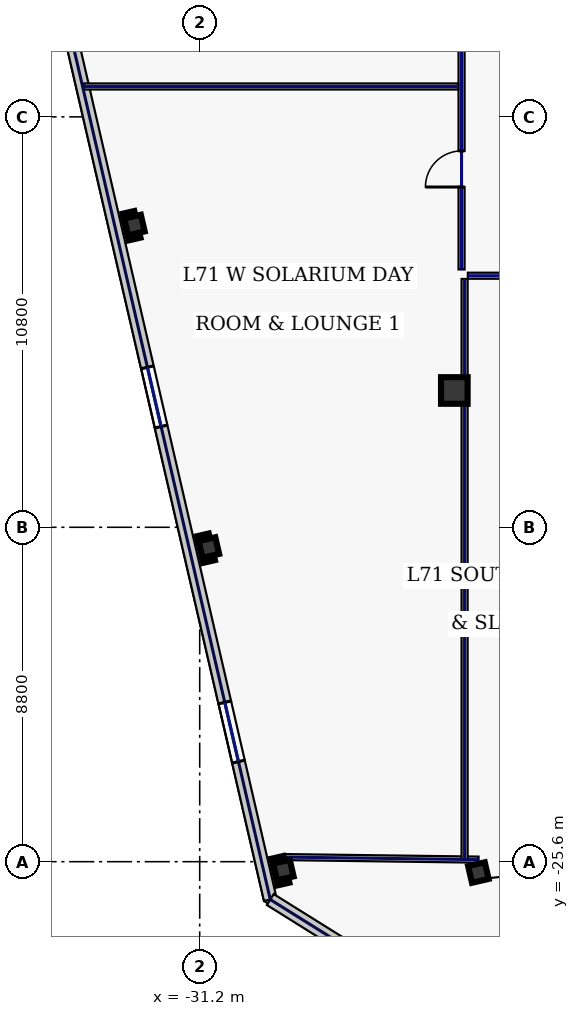
"""IFC4 building model, lengths in metres.
Left out: names, types, materials, properties, quantities, classifications, styles, units other than length and angle.
Written with IfcOpenShell. Run it as: python <this file> out.ifc"""

import sys

from ifc_helpers import new_model, si_unit, direction, frame, frame_2d, origin, origin_2d, place, context, subcontext, project, spatial, rectangle, hollow_rectangle, extrude, element, fill, save


model = new_model("IFC4")
c1 = context("Model", 3, precision=1e-05, world=origin(), true_north=direction((0.0, 1.0)))
c2 = subcontext(c1, "Body", "Model", "MODEL_VIEW")
j1 = project(units=[si_unit("LENGTHUNIT", "METRE"), si_unit("PLANEANGLEUNIT", "RADIAN")], contexts=[c1])
p1 = place(None, origin())
s1 = spatial("IfcSite", under=j1, at=p1, CompositionType="ELEMENT")
p2 = place(p1, origin())
s2 = spatial("IfcBuilding", under=s1, at=p2, CompositionType="ELEMENT")
p3 = place(p2, frame((0.0, 0.0, 305.0)))
s3 = spatial("IfcBuildingStorey", under=s2, at=p3, CompositionType="ELEMENT", Elevation=305.0)
p4 = place(p3, frame((-24.5, -13.2, 0.0), z_axis=(0.0, 0.0, 1.0), x_axis=(1.0, 0.0, 0.0)))
e1 = element("IfcColumn", 1, at=p4, inside=s3, PredefinedType="COLUMN", context=c2, shape_type="SweptSolid", body=[
    extrude(hollow_rectangle(XDim=0.7, YDim=0.7, WallThickness=0.032, at=origin_2d()), origin(), (0.0, 0.0, 1.0), 3.74),
])
for number, where, z_axis, x_axis in (
    (2, (-23.867, -25.886, 0.0), (0.0, 0.0, 1.0), (0.974, 0.225, 0.0)),
    (3, (-32.917, -8.845, 0.0), (0.0, 0.0, 1.0), (0.974, 0.225, 0.0)),
    (4, (-30.958, -17.332, 0.0), (0.0, 0.0, 1.0), (0.974, 0.225, 0.0)),
    (5, (-28.999, -25.819, 0.0), (0.0, 0.0, 1.0), (0.974, 0.225, 0.0)),
):
    element("IfcColumn", number, at=place(p3, frame(where, z_axis=z_axis, x_axis=x_axis)), inside=s3, PredefinedType="COLUMN", context=c2, shape_type="SweptSolid", body=[
        extrude(hollow_rectangle(XDim=0.45, YDim=0.45, WallThickness=0.022, at=origin_2d()), origin(), (0.0, 0.0, 1.0), 3.74),
    ])
p5 = place(p3, frame((-24.03, -29.916, 0.0), z_axis=(0.0, 0.0, 1.0), x_axis=(0.974370978061, 0.224947098473, 0.0)))
e6 = element("IfcWall", 6, at=p5, inside=s3, PredefinedType="STANDARD", context=c2, shape_type="SweptSolid", body=[
    extrude(rectangle(XDim=17.506, YDim=0.34, at=frame_2d((8.753, 0.0))), origin(), (0.0, 0.0, 1.0), 3.74),
])
p6 = place(p5, frame((2.35, 0.0, 0.9)))
e7 = element("IfcOpeningElement", 7, at=p6, cuts=e6, PredefinedType="OPENING", context=c2, shape_type="SweptSolid", body=[
    extrude(rectangle(XDim=1.5, YDim=2.0, at=frame_2d((0.75, 1.0))), frame((0.0, 0.18, 0.0), z_axis=(0.0, -1.0, 0.0), x_axis=(1.0, 0.0, 0.0)), (0.0, 0.0, 1.0), 0.36),
])
p7 = place(p5, frame((5.817, 0.0, 0.9)))
e8 = element("IfcOpeningElement", 8, at=p7, cuts=e6, PredefinedType="OPENING", context=c2, shape_type="SweptSolid", body=[
    extrude(rectangle(XDim=1.5, YDim=2.0, at=frame_2d((0.75, 1.0))), frame((0.0, 0.18, 0.0), z_axis=(0.0, -1.0, 0.0), x_axis=(1.0, 0.0, 0.0)), (0.0, 0.0, 1.0), 0.36),
])
p8 = place(p5, frame((9.886, 0.0, 0.9)))
e9 = element("IfcOpeningElement", 9, at=p8, cuts=e6, PredefinedType="OPENING", context=c2, shape_type="SweptSolid", body=[
    extrude(rectangle(XDim=1.5, YDim=2.0, at=frame_2d((0.75, 1.0))), frame((0.0, 0.18, 0.0), z_axis=(0.0, -1.0, 0.0), x_axis=(1.0, 0.0, 0.0)), (0.0, 0.0, 1.0), 0.36),
])
p9 = place(p5, frame((13.353, 0.0, 0.9)))
e10 = element("IfcOpeningElement", 10, at=p9, cuts=e6, PredefinedType="OPENING", context=c2, shape_type="SweptSolid", body=[
    extrude(rectangle(XDim=1.5, YDim=2.0, at=frame_2d((0.75, 1.0))), frame((0.0, 0.18, 0.0), z_axis=(0.0, -1.0, 0.0), x_axis=(1.0, 0.0, 0.0)), (0.0, 0.0, 1.0), 0.36),
])
p10 = place(p3, frame((-37.486, 8.676, 0.0), z_axis=(0.0, 0.0, 1.0), x_axis=(0.224953091034, -0.974369594576, 0.0)))
e11 = element("IfcWall", 11, at=p10, inside=s3, PredefinedType="STANDARD", context=c2, shape_type="SweptSolid", body=[
    extrude(rectangle(XDim=36.2, YDim=0.34, at=frame_2d((18.1, 0.0))), origin(), (0.0, 0.0, 1.0), 3.74),
])
p11 = place(p10, frame((21.825, 0.0, 0.22)))
e12 = element("IfcOpeningElement", 12, at=p11, cuts=e11, PredefinedType="OPENING", context=c2, shape_type="SweptSolid", body=[
    extrude(rectangle(XDim=1.6, YDim=1.2, at=frame_2d((0.8, 0.6))), frame((0.0, 0.18, 0.0), z_axis=(0.0, -1.0, 0.0), x_axis=(1.0, 0.0, 0.0)), (0.0, 0.0, 1.0), 0.36),
])
p12 = place(p10, frame((30.875, 0.0, 0.22)))
e13 = element("IfcOpeningElement", 13, at=p12, cuts=e11, PredefinedType="OPENING", context=c2, shape_type="SweptSolid", body=[
    extrude(rectangle(XDim=1.6, YDim=1.2, at=frame_2d((0.8, 0.6))), frame((0.0, 0.18, 0.0), z_axis=(0.0, -1.0, 0.0), x_axis=(1.0, 0.0, 0.0)), (0.0, 0.0, 1.0), 0.36),
])
p13 = place(p3, frame((-29.343, -26.596, 0.0), z_axis=(0.0, 0.0, 1.0), x_axis=(0.848037708252, -0.529935887993, 0.0)))
e14 = element("IfcWall", 14, at=p13, inside=s3, PredefinedType="STANDARD", context=c2, shape_type="SweptSolid", body=[
    extrude(rectangle(XDim=6.265, YDim=0.34, at=frame_2d((3.133, 0.0))), origin(), (0.0, 0.0, 1.0), 3.74),
])
p14 = place(p3, frame((-28.994, -25.479, 0.0), z_axis=(0.0, 0.0, 1.0), x_axis=(0.999915052546, -0.01303409726, 0.0)))
e15 = element("IfcWall", 15, at=p14, inside=s3, PredefinedType="PARTITIONING", context=c2, shape_type="SweptSolid", body=[
    extrude(rectangle(XDim=5.132, YDim=0.16, at=frame_2d((2.566, 0.0))), origin(), (0.0, 0.0, 1.0), 1.535),
])
p15 = place(p3, frame((-24.31, -10.015, 0.0), z_axis=(0.0, 0.0, 1.0), x_axis=(0.0, 1.0, 0.0)))
e16 = element("IfcWall", 16, at=p15, inside=s3, PredefinedType="PARTITIONING", context=c2, shape_type="SweptSolid", body=[
    extrude(rectangle(XDim=20.13, YDim=0.16, at=frame_2d((10.065, 0.0))), origin(), (0.0, 0.0, 1.0), 3.74),
])
p16 = place(p15, frame((2.169, 0.0, 0.0)))
e17 = element("IfcOpeningElement", 17, at=p16, cuts=e16, PredefinedType="OPENING", context=c2, shape_type="SweptSolid", body=[
    extrude(rectangle(XDim=0.95, YDim=2.2, at=frame_2d((0.475, 1.1))), frame((0.0, 0.09, 0.0), z_axis=(0.0, -1.0, 0.0), x_axis=(1.0, 0.0, 0.0)), (0.0, 0.0, 1.0), 0.18),
])
p17 = place(p15, frame((7.025, 0.0, 0.0)))
e18 = element("IfcOpeningElement", 18, at=p17, cuts=e16, PredefinedType="OPENING", context=c2, shape_type="SweptSolid", body=[
    extrude(rectangle(XDim=0.95, YDim=2.2, at=frame_2d((0.475, 1.1))), frame((0.0, 0.09, 0.0), z_axis=(0.0, -1.0, 0.0), x_axis=(1.0, 0.0, 0.0)), (0.0, 0.0, 1.0), 0.18),
])
p18 = place(p15, frame((12.225, 0.0, 0.0)))
e19 = element("IfcOpeningElement", 19, at=p18, cuts=e16, PredefinedType="OPENING", context=c2, shape_type="SweptSolid", body=[
    extrude(rectangle(XDim=0.95, YDim=2.2, at=frame_2d((0.475, 1.1))), frame((0.0, 0.09, 0.0), z_axis=(0.0, -1.0, 0.0), x_axis=(1.0, 0.0, 0.0)), (0.0, 0.0, 1.0), 0.18),
])
p19 = place(p15, frame((17.131, 0.0, 0.0)))
e20 = element("IfcOpeningElement", 20, at=p19, cuts=e16, PredefinedType="OPENING", context=c2, shape_type="SweptSolid", body=[
    extrude(rectangle(XDim=0.95, YDim=2.2, at=frame_2d((0.475, 1.1))), frame((0.0, 0.09, 0.0), z_axis=(0.0, -1.0, 0.0), x_axis=(1.0, 0.0, 0.0)), (0.0, 0.0, 1.0), 0.18),
])
p20 = place(p3, frame((-15.065, -10.18, 0.0), z_axis=(0.0, 0.0, 1.0), x_axis=(-1.0, 0.0, 0.0)))
e21 = element("IfcWall", 21, at=p20, inside=s3, PredefinedType="PARTITIONING", context=c2, shape_type="SweptSolid", body=[
    extrude(rectangle(XDim=9.08, YDim=0.16, at=frame_2d((4.54, 0.0))), origin(), (0.0, 0.0, 1.0), 3.74),
])
p21 = place(p20, frame((6.256, 0.0, 0.0)))
e22 = element("IfcOpeningElement", 22, at=p21, cuts=e21, PredefinedType="OPENING", context=c2, shape_type="SweptSolid", body=[
    extrude(rectangle(XDim=0.95, YDim=2.2, at=frame_2d((0.475, 1.1))), frame((0.0, 0.09, 0.0), z_axis=(0.0, -1.0, 0.0), x_axis=(1.0, 0.0, 0.0)), (0.0, 0.0, 1.0), 0.18),
])
p22 = place(p3, frame((-24.23, -25.536, 0.0), z_axis=(0.0, 0.0, 1.0), x_axis=(0.0, 1.0, 0.0)))
e23 = element("IfcWall", 23, at=p22, inside=s3, PredefinedType="PARTITIONING", context=c2, shape_type="SweptSolid", body=[
    extrude(rectangle(XDim=15.271, YDim=0.16, at=frame_2d((7.635, 0.0))), origin(), (0.0, 0.0, 1.0), 3.335),
])
p23 = place(p3, frame((-34.262, -5.2, 0.0), z_axis=(0.0, 0.0, 1.0), x_axis=(1.0, 0.0, 0.0)))
e24 = element("IfcWall", 24, at=p23, inside=s3, PredefinedType="PARTITIONING", context=c2, shape_type="SweptSolid", body=[
    extrude(rectangle(XDim=9.867, YDim=0.16, at=frame_2d((4.933, 0.0))), origin(), (0.0, 0.0, 1.0), 3.74),
])
p24 = place(p11, origin())
e25 = element("IfcWindow", 25, at=p24, inside=s3, PartitioningType="SINGLE_PANEL", PredefinedType="WINDOW", context=c2, shape_type="SweptSolid", body=[
    extrude(rectangle(XDim=1.6, YDim=1.2, at=frame_2d((0.8, 0.6))), frame((0.0, 0.03, 0.0), z_axis=(0.0, -1.0, 0.0), x_axis=(1.0, 0.0, 0.0)), (0.0, 0.0, 1.0), 0.06),
])
fill(e12, e25)
p25 = place(p12, origin())
e26 = element("IfcWindow", 26, at=p25, inside=s3, PartitioningType="SINGLE_PANEL", PredefinedType="WINDOW", context=c2, shape_type="SweptSolid", body=[
    extrude(rectangle(XDim=1.6, YDim=1.2, at=frame_2d((0.8, 0.6))), frame((0.0, 0.03, 0.0), z_axis=(0.0, -1.0, 0.0), x_axis=(1.0, 0.0, 0.0)), (0.0, 0.0, 1.0), 0.06),
])
fill(e13, e26)
p26 = place(p16, origin())
e27 = element("IfcDoor", 27, at=p26, inside=s3, OperationType="SINGLE_SWING_LEFT", PredefinedType="DOOR", context=c2, shape_type="SweptSolid", body=[
    extrude(rectangle(XDim=0.95, YDim=2.2, at=frame_2d((0.475, 1.1))), frame((0.0, 0.025, 0.0), z_axis=(0.0, -1.0, 0.0), x_axis=(1.0, 0.0, 0.0)), (0.0, 0.0, 1.0), 0.05),
])
fill(e17, e27)
save(model, sys.argv[1])
